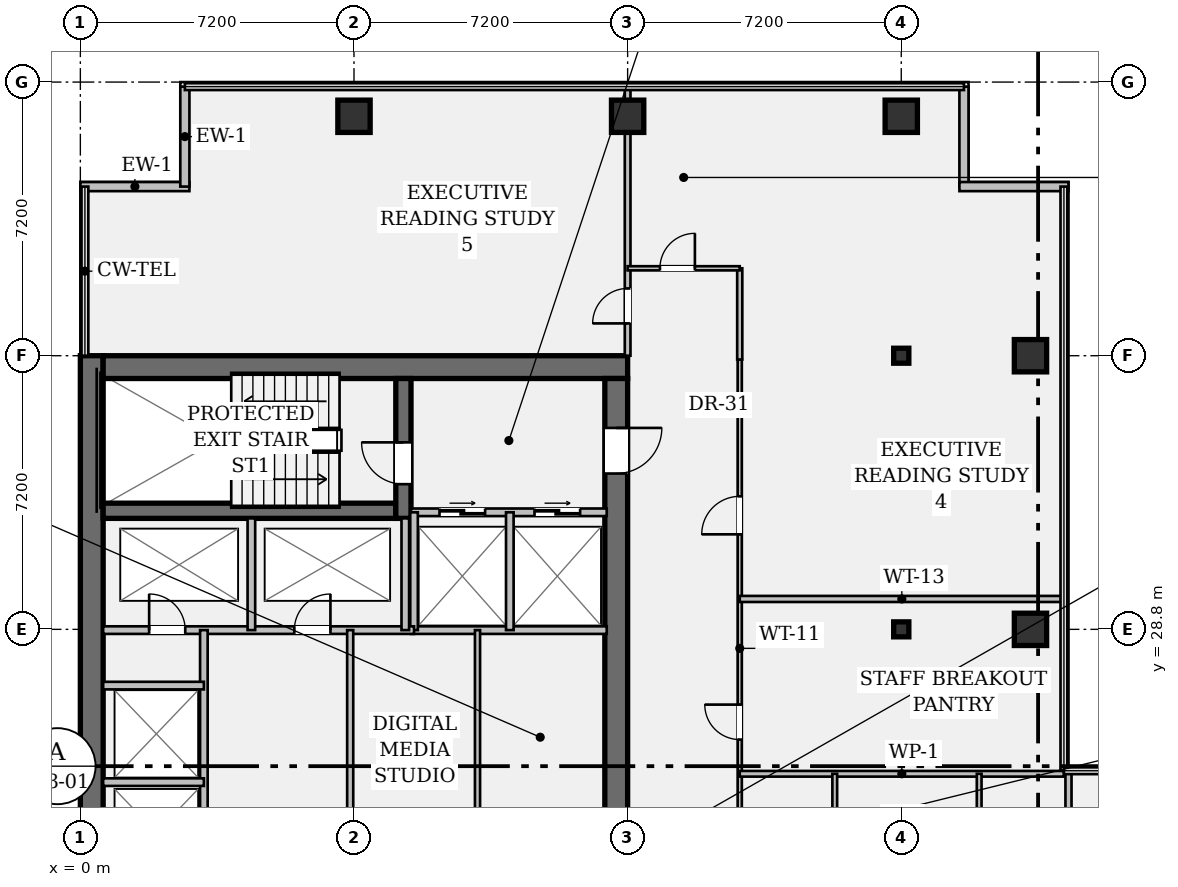
"""IFC4 building model, lengths in metres.
Left out: names, types, materials, properties, quantities, classifications, styles, units other than length and angle.
Written with IfcOpenShell. Run it as: python <this file> out.ifc"""

import sys

from ifc_helpers import new_model, si_unit, direction, frame, frame_2d, origin, origin_2d, place, context, subcontext, project, spatial, rectangle, hollow_rectangle, i_section, extrude, element, fill, save


model = new_model("IFC4")
c1 = context("Model", 3, precision=1e-05, world=origin(), true_north=direction((0.0, 1.0)))
c2 = subcontext(c1, "Body", "Model", "MODEL_VIEW")
j1 = project(units=[si_unit("LENGTHUNIT", "METRE"), si_unit("PLANEANGLEUNIT", "RADIAN")], contexts=[c1])
p1 = place(None, origin())
s1 = spatial("IfcSite", under=j1, at=p1, CompositionType="ELEMENT")
p2 = place(p1, origin())
s2 = spatial("IfcBuilding", under=s1, at=p2, CompositionType="ELEMENT")
p3 = place(p2, frame((0.0, 0.0, 156.1)))
s3 = spatial("IfcBuildingStorey", under=s2, at=p3, CompositionType="ELEMENT", Elevation=156.1)
p4 = place(p3, frame((0.3, 7.2, 0.0), z_axis=(0.0, 0.0, 1.0), x_axis=(0.0, 1.0, 0.0)))
e1 = element("IfcWall", 1, at=p4, inside=s3, PredefinedType="SHEAR", context=c2, shape_type="SweptSolid", body=[
    extrude(rectangle(XDim=28.8, YDim=0.6, at=frame_2d((14.4, 0.0))), origin(), (0.0, 0.0, 1.0), 3.58),
])
p5 = place(p3, frame((0.6, 35.7, 0.0), z_axis=(0.0, 0.0, 1.0), x_axis=(1.0, 0.0, 0.0)))
e2 = element("IfcWall", 2, at=p5, inside=s3, PredefinedType="SHEAR", context=c2, shape_type="SweptSolid", body=[
    extrude(rectangle(XDim=13.8, YDim=0.6, at=frame_2d((6.9, 0.0))), origin(), (0.0, 0.0, 1.0), 3.58),
])
p6 = place(p3, frame((14.1, 35.4, 0.0), z_axis=(0.0, 0.0, 1.0), x_axis=(0.0, -1.0, 0.0)))
e3 = element("IfcWall", 3, at=p6, inside=s3, PredefinedType="SHEAR", context=c2, shape_type="SweptSolid", body=[
    extrude(rectangle(XDim=27.6, YDim=0.6, at=frame_2d((13.8, 0.0))), origin(), (0.0, 0.0, 1.0), 3.58),
])
p7 = place(p6, frame((1.3, 0.0, 0.0)))
e4 = element("IfcOpeningElement", 4, at=p7, cuts=e3, PredefinedType="OPENING", context=c2, shape_type="SweptSolid", body=[
    extrude(rectangle(XDim=1.2, YDim=2.15, at=frame_2d((0.6, 1.075))), frame((0.0, 0.312, 0.0), z_axis=(0.0, -1.0, 0.0), x_axis=(1.0, 0.0, 0.0)), (0.0, 0.0, 1.0), 0.624),
])
p8 = place(p6, frame((25.25, 0.0, 0.0)))
e5 = element("IfcOpeningElement", 5, at=p8, cuts=e3, PredefinedType="OPENING", context=c2, shape_type="SweptSolid", body=[
    extrude(rectangle(XDim=1.2, YDim=2.15, at=frame_2d((0.6, 1.075))), frame((0.0, 0.312, 0.0), z_axis=(0.0, -1.0, 0.0), x_axis=(1.0, 0.0, 0.0)), (0.0, 0.0, 1.0), 0.624),
])
p9 = place(p6, frame((14.6, 0.0, 0.0)))
e6 = element("IfcOpeningElement", 6, at=p9, cuts=e3, PredefinedType="OPENING", context=c2, shape_type="SweptSolid", body=[
    extrude(rectangle(XDim=1.6, YDim=2.2, at=frame_2d((0.8, 1.1))), frame((0.0, 0.312, 0.0), z_axis=(0.0, -1.0, 0.0), x_axis=(1.0, 0.0, 0.0)), (0.0, 0.0, 1.0), 0.624),
])
p10 = place(p3, frame((0.6, 31.92, 0.0), z_axis=(0.0, 0.0, 1.0), x_axis=(1.0, 0.0, 0.0)))
e7 = element("IfcWall", 7, at=p10, inside=s3, PredefinedType="SHEAR", context=c2, shape_type="SweptSolid", body=[
    extrude(rectangle(XDim=7.7, YDim=0.4, at=frame_2d((3.85, 0.0))), origin(), (0.0, 0.0, 1.0), 3.58),
])
p11 = place(p3, frame((8.5, 31.72, 0.0), z_axis=(0.0, 0.0, 1.0), x_axis=(0.0, 1.0, 0.0)))
e8 = element("IfcWall", 8, at=p11, inside=s3, PredefinedType="SHEAR", context=c2, shape_type="SweptSolid", body=[
    extrude(rectangle(XDim=3.68, YDim=0.4, at=frame_2d((1.84, 0.0))), origin(), (0.0, 0.0, 1.0), 3.58),
])
p12 = place(p11, frame((0.9, 0.0, 0.0)))
e9 = element("IfcOpeningElement", 9, at=p12, cuts=e8, PredefinedType="OPENING", context=c2, shape_type="SweptSolid", body=[
    extrude(rectangle(XDim=1.1, YDim=2.15, at=frame_2d((0.55, 1.075))), frame((0.0, 0.212, 0.0), z_axis=(0.0, -1.0, 0.0), x_axis=(1.0, 0.0, 0.0)), (0.0, 0.0, 1.0), 0.424),
])
for number, where, z_axis, x_axis in (
    (10, (7.2, 42.3, 0.0), (0.0, 0.0, 1.0), (1.0, 0.0, 0.0)),
    (11, (14.4, 42.3, 0.0), (0.0, 0.0, 1.0), (1.0, 0.0, 0.0)),
):
    element("IfcColumn", number, at=place(p3, frame(where, z_axis=z_axis, x_axis=x_axis)), inside=s3, PredefinedType="COLUMN", context=c2, shape_type="SweptSolid", body=[
        extrude(hollow_rectangle(XDim=0.85, YDim=0.85, WallThickness=0.05, at=origin_2d()), origin(), (0.0, 0.0, 1.0), 3.58),
    ])
for number, where, z_axis, x_axis in (
    (12, (21.6, 28.8, 0.0), (0.0, 0.0, 1.0), (1.0, 0.0, 0.0)),
    (13, (21.6, 36.0, 0.0), (0.0, 0.0, 1.0), (1.0, 0.0, 0.0)),
):
    element("IfcColumn", number, at=place(p3, frame(where, z_axis=z_axis, x_axis=x_axis)), inside=s3, PredefinedType="COLUMN", context=c2, shape_type="SweptSolid", body=[
        extrude(i_section(OverallWidth=0.399, OverallDepth=0.394, WebThickness=0.023, FlangeThickness=0.037, FilletRadius=0.018, at=origin_2d()), origin(), (0.0, 0.0, 1.0), 3.58),
    ])
for number, where, z_axis, x_axis in (
    (14, (21.6, 42.3, 0.0), (0.0, 0.0, 1.0), (1.0, 0.0, 0.0)),
    (15, (25.0, 28.8, 0.0), (0.0, 0.0, 1.0), (1.0, 0.0, 0.0)),
    (16, (25.0, 36.0, 0.0), (0.0, 0.0, 1.0), (1.0, 0.0, 0.0)),
):
    element("IfcColumn", number, at=place(p3, frame(where, z_axis=z_axis, x_axis=x_axis)), inside=s3, PredefinedType="COLUMN", context=c2, shape_type="SweptSolid", body=[
        extrude(hollow_rectangle(XDim=0.85, YDim=0.85, WallThickness=0.05, at=origin_2d()), origin(), (0.0, 0.0, 1.0), 3.58),
    ])
p13 = place(p3, frame((0.0, 40.45, 0.0), z_axis=(0.0, 0.0, 1.0), x_axis=(1.0, 0.0, 0.0)))
e17 = element("IfcWall", 17, at=p13, inside=s3, PredefinedType="STANDARD", context=c2, shape_type="SweptSolid", body=[
    extrude(rectangle(XDim=2.87, YDim=0.24, at=frame_2d((1.435, 0.0))), origin(), (0.0, 0.0, 1.0), 3.58),
])
for number, where, z_axis, x_axis in (
    (18, (2.75, 40.45, 0.0), (0.0, 0.0, 1.0), (0.0, 1.0, 0.0)),
    (19, (23.25, 43.08, 0.0), (0.0, 0.0, 1.0), (0.0, -1.0, 0.0)),
):
    element("IfcWall", number, at=place(p3, frame(where, z_axis=z_axis, x_axis=x_axis)), inside=s3, PredefinedType="STANDARD", context=c2, shape_type="SweptSolid", body=[
        extrude(rectangle(XDim=2.63, YDim=0.24, at=frame_2d((1.315, 0.0))), origin(), (0.0, 0.0, 1.0), 3.58),
    ])
p14 = place(p3, frame((23.13, 40.45, 0.0), z_axis=(0.0, 0.0, 1.0), x_axis=(1.0, 0.0, 0.0)))
e20 = element("IfcWall", 20, at=p14, inside=s3, PredefinedType="STANDARD", context=c2, shape_type="SweptSolid", body=[
    extrude(rectangle(XDim=2.87, YDim=0.24, at=frame_2d((1.435, 0.0))), origin(), (0.0, 0.0, 1.0), 3.58),
])
p15 = place(p3, frame((8.7, 31.88, 0.0), z_axis=(0.0, 0.0, 1.0), x_axis=(1.0, 0.0, 0.0)))
e21 = element("IfcWall", 21, at=p15, inside=s3, PredefinedType="PARTITIONING", context=c2, shape_type="SweptSolid", body=[
    extrude(rectangle(XDim=5.15, YDim=0.2, at=frame_2d((2.575, 0.0))), origin(), (0.0, 0.0, 1.0), 3.58),
])
p16 = place(p15, frame((0.75, 0.0, 0.0)))
e22 = element("IfcOpeningElement", 22, at=p16, cuts=e21, PredefinedType="OPENING", context=c2, shape_type="SweptSolid", body=[
    extrude(rectangle(XDim=1.2, YDim=2.2, at=frame_2d((0.6, 1.1))), frame((0.0, 0.112, 0.0), z_axis=(0.0, -1.0, 0.0), x_axis=(1.0, 0.0, 0.0)), (0.0, 0.0, 1.0), 0.224),
])
p17 = place(p15, frame((3.25, 0.0, 0.0)))
e23 = element("IfcOpeningElement", 23, at=p17, cuts=e21, PredefinedType="OPENING", context=c2, shape_type="SweptSolid", body=[
    extrude(rectangle(XDim=1.2, YDim=2.2, at=frame_2d((0.6, 1.1))), frame((0.0, 0.112, 0.0), z_axis=(0.0, -1.0, 0.0), x_axis=(1.0, 0.0, 0.0)), (0.0, 0.0, 1.0), 0.224),
])
p18 = place(p3, frame((8.7, 28.78, 0.0), z_axis=(0.0, 0.0, 1.0), x_axis=(1.0, 0.0, 0.0)))
e24 = element("IfcWall", 24, at=p18, inside=s3, PredefinedType="PARTITIONING", context=c2, shape_type="SweptSolid", body=[
    extrude(rectangle(XDim=5.15, YDim=0.2, at=frame_2d((2.575, 0.0))), origin(), (0.0, 0.0, 1.0), 3.58),
])
for number, where, z_axis, x_axis in (
    (25, (8.78, 28.78, 0.0), (0.0, 0.0, 1.0), (0.0, 1.0, 0.0)),
    (26, (11.3, 28.78, 0.0), (0.0, 0.0, 1.0), (0.0, 1.0, 0.0)),
):
    element("IfcWall", number, at=place(p3, frame(where, z_axis=z_axis, x_axis=x_axis)), inside=s3, PredefinedType="PARTITIONING", context=c2, shape_type="SweptSolid", body=[
        extrude(rectangle(XDim=3.1, YDim=0.2, at=frame_2d((1.55, 0.0))), origin(), (0.0, 0.0, 1.0), 3.58),
    ])
p19 = place(p3, frame((0.6, 28.78, 0.0), z_axis=(0.0, 0.0, 1.0), x_axis=(1.0, 0.0, 0.0)))
e27 = element("IfcWall", 27, at=p19, inside=s3, PredefinedType="PARTITIONING", context=c2, shape_type="SweptSolid", body=[
    extrude(rectangle(XDim=8.18, YDim=0.2, at=frame_2d((4.09, 0.0))), origin(), (0.0, 0.0, 1.0), 3.58),
])
p20 = place(p19, frame((1.21, 0.0, 0.0)))
e28 = element("IfcOpeningElement", 28, at=p20, cuts=e27, PredefinedType="OPENING", context=c2, shape_type="SweptSolid", body=[
    extrude(rectangle(XDim=0.95, YDim=2.15, at=frame_2d((0.475, 1.075))), frame((0.0, 0.112, 0.0), z_axis=(0.0, -1.0, 0.0), x_axis=(1.0, 0.0, 0.0)), (0.0, 0.0, 1.0), 0.224),
])
p21 = place(p19, frame((5.03, 0.0, 0.0)))
e29 = element("IfcOpeningElement", 29, at=p21, cuts=e27, PredefinedType="OPENING", context=c2, shape_type="SweptSolid", body=[
    extrude(rectangle(XDim=0.95, YDim=2.15, at=frame_2d((0.475, 1.075))), frame((0.0, 0.112, 0.0), z_axis=(0.0, -1.0, 0.0), x_axis=(1.0, 0.0, 0.0)), (0.0, 0.0, 1.0), 0.224),
])
for number, where, z_axis, x_axis in (
    (30, (4.5, 28.78, 0.0), (0.0, 0.0, 1.0), (0.0, 1.0, 0.0)),
    (31, (8.55, 28.78, 0.0), (0.0, 0.0, 1.0), (0.0, 1.0, 0.0)),
):
    element("IfcWall", number, at=place(p3, frame(where, z_axis=z_axis, x_axis=x_axis)), inside=s3, PredefinedType="PARTITIONING", context=c2, shape_type="SweptSolid", body=[
        extrude(rectangle(XDim=2.94, YDim=0.2, at=frame_2d((1.47, 0.0))), origin(), (0.0, 0.0, 1.0), 3.58),
    ])
p22 = place(p3, frame((3.25, 15.7, 0.0), z_axis=(0.0, 0.0, 1.0), x_axis=(0.0, 1.0, 0.0)))
e32 = element("IfcWall", 32, at=p22, inside=s3, PredefinedType="PARTITIONING", context=c2, shape_type="SweptSolid", body=[
    extrude(rectangle(XDim=13.08, YDim=0.2, at=frame_2d((6.54, 0.0))), origin(), (0.0, 0.0, 1.0), 3.58),
])
for number, where, z_axis, x_axis in (
    (33, (0.6, 24.78, 0.0), (0.0, 0.0, 1.0), (1.0, 0.0, 0.0)),
    (34, (0.6, 27.32, 0.0), (0.0, 0.0, 1.0), (1.0, 0.0, 0.0)),
):
    element("IfcWall", number, at=place(p3, frame(where, z_axis=z_axis, x_axis=x_axis)), inside=s3, PredefinedType="PARTITIONING", context=c2, shape_type="SweptSolid", body=[
        extrude(rectangle(XDim=2.65, YDim=0.2, at=frame_2d((1.325, 0.0))), origin(), (0.0, 0.0, 1.0), 3.58),
    ])
p23 = place(p3, frame((7.1, 22.2, 0.0), z_axis=(0.0, 0.0, 1.0), x_axis=(0.0, 1.0, 0.0)))
e35 = element("IfcWall", 35, at=p23, inside=s3, PredefinedType="PARTITIONING", context=c2, shape_type="SweptSolid", body=[
    extrude(rectangle(XDim=6.58, YDim=0.16, at=frame_2d((3.29, 0.0))), origin(), (0.0, 0.0, 1.0), 3.58),
])
p24 = place(p3, frame((10.45, 22.2, 0.0), z_axis=(0.0, 0.0, 1.0), x_axis=(0.0, 1.0, 0.0)))
e36 = element("IfcWall", 36, at=p24, inside=s3, PredefinedType="PARTITIONING", context=c2, shape_type="SweptSolid", body=[
    extrude(rectangle(XDim=6.58, YDim=0.135, at=frame_2d((3.29, 0.0))), origin(), (0.0, 0.0, 1.0), 3.58),
])
p25 = place(p3, frame((17.35, 20.7, 0.0), z_axis=(0.0, 0.0, 1.0), x_axis=(0.0, 1.0, 0.0)))
e37 = element("IfcWall", 37, at=p25, inside=s3, PredefinedType="PARTITIONING", context=c2, shape_type="SweptSolid", body=[
    extrude(rectangle(XDim=15.2, YDim=0.11, at=frame_2d((7.6, 0.0))), origin(), (0.0, 0.0, 1.0), 2.869),
])
p26 = place(p25, frame((5.2, 0.0, 0.0)))
e38 = element("IfcOpeningElement", 38, at=p26, cuts=e37, PredefinedType="OPENING", context=c2, shape_type="SweptSolid", body=[
    extrude(rectangle(XDim=0.92, YDim=2.15, at=frame_2d((0.46, 1.075))), frame((0.0, 0.067, 0.0), z_axis=(0.0, -1.0, 0.0), x_axis=(1.0, 0.0, 0.0)), (0.0, 0.0, 1.0), 0.134),
])
p27 = place(p25, frame((10.6, 0.0, 0.0)))
e39 = element("IfcOpeningElement", 39, at=p27, cuts=e37, PredefinedType="OPENING", context=c2, shape_type="SweptSolid", body=[
    extrude(rectangle(XDim=1.0, YDim=2.15, at=frame_2d((0.5, 1.075))), frame((0.0, 0.067, 0.0), z_axis=(0.0, -1.0, 0.0), x_axis=(1.0, 0.0, 0.0)), (0.0, 0.0, 1.0), 0.134),
])
p28 = place(p3, frame((17.35, 25.0, 0.0), z_axis=(0.0, 0.0, 1.0), x_axis=(1.0, 0.0, 0.0)))
e40 = element("IfcWall", 40, at=p28, inside=s3, PredefinedType="PARTITIONING", context=c2, shape_type="SweptSolid", body=[
    extrude(rectangle(XDim=8.53, YDim=0.15, at=frame_2d((4.265, 0.0))), origin(), (0.0, 0.0, 1.0), 2.869),
])
for number, where, z_axis, x_axis in (
    (41, (19.85, 20.7, 0.0), (0.0, 0.0, 1.0), (0.0, 1.0, 0.0)),
    (42, (23.65, 20.7, 0.0), (0.0, 0.0, 1.0), (0.0, 1.0, 0.0)),
):
    element("IfcWall", number, at=place(p3, frame(where, z_axis=z_axis, x_axis=x_axis)), inside=s3, PredefinedType="PARTITIONING", context=c2, shape_type="SweptSolid", body=[
        extrude(rectangle(XDim=4.3, YDim=0.125, at=frame_2d((2.15, 0.0))), origin(), (0.0, 0.0, 1.0), 2.869),
    ])
p29 = place(p3, frame((17.35, 29.6, 0.0), z_axis=(0.0, 0.0, 1.0), x_axis=(1.0, 0.0, 0.0)))
e43 = element("IfcWall", 43, at=p29, inside=s3, PredefinedType="PARTITIONING", context=c2, shape_type="SweptSolid", body=[
    extrude(rectangle(XDim=8.53, YDim=0.16, at=frame_2d((4.265, 0.0))), origin(), (0.0, 0.0, 1.0), 2.869),
])
p30 = place(p3, frame((14.4, 36.0, 0.0), z_axis=(0.0, 0.0, 1.0), x_axis=(0.0, 1.0, 0.0)))
e44 = element("IfcWall", 44, at=p30, inside=s3, PredefinedType="PARTITIONING", context=c2, shape_type="SweptSolid", body=[
    extrude(rectangle(XDim=7.08, YDim=0.15, at=frame_2d((3.54, 0.0))), origin(), (0.0, 0.0, 1.0), 2.869),
])
p31 = place(p30, frame((0.85, 0.0, 0.0)))
e45 = element("IfcOpeningElement", 45, at=p31, cuts=e44, PredefinedType="OPENING", context=c2, shape_type="SweptSolid", body=[
    extrude(rectangle(XDim=0.92, YDim=2.15, at=frame_2d((0.46, 1.075))), frame((0.0, 0.087, 0.0), z_axis=(0.0, -1.0, 0.0), x_axis=(1.0, 0.0, 0.0)), (0.0, 0.0, 1.0), 0.174),
])
p32 = place(p3, frame((17.35, 35.9, 0.0), z_axis=(0.0, 0.0, 1.0), x_axis=(0.0, 1.0, 0.0)))
e46 = element("IfcWall", 46, at=p32, inside=s3, PredefinedType="PARTITIONING", context=c2, shape_type="SweptSolid", body=[
    extrude(rectangle(XDim=2.4, YDim=0.135, at=frame_2d((1.2, 0.0))), origin(), (0.0, 0.0, 1.0), 2.869),
])
p33 = place(p3, frame((14.4, 38.3, 0.0), z_axis=(0.0, 0.0, 1.0), x_axis=(1.0, 0.0, 0.0)))
e47 = element("IfcWall", 47, at=p33, inside=s3, PredefinedType="PARTITIONING", context=c2, shape_type="SweptSolid", body=[
    extrude(rectangle(XDim=2.95, YDim=0.11, at=frame_2d((1.475, 0.0))), origin(), (0.0, 0.0, 1.0), 3.148),
])
p34 = place(p33, frame((0.85, 0.0, 0.0)))
e48 = element("IfcOpeningElement", 48, at=p34, cuts=e47, PredefinedType="OPENING", context=c2, shape_type="SweptSolid", body=[
    extrude(rectangle(XDim=0.92, YDim=2.15, at=frame_2d((0.46, 1.075))), frame((0.0, 0.067, 0.0), z_axis=(0.0, -1.0, 0.0), x_axis=(1.0, 0.0, 0.0)), (0.0, 0.0, 1.0), 0.134),
])
p35 = place(p3, frame((26.0, 20.7, 0.0), z_axis=(0.0, 0.0, 1.0), x_axis=(0.0, 1.0, 0.0)))
e49 = element("IfcWall", 49, at=p35, inside=s3, PredefinedType="PARTITIONING", context=c2, shape_type="SweptSolid", body=[
    extrude(rectangle(XDim=4.38, YDim=0.16, at=frame_2d((2.19, 0.0))), origin(), (0.0, 0.0, 1.0), 2.869),
])
p36 = place(p12, origin())
e50 = element("IfcDoor", 50, at=p36, inside=s3, OperationType="SINGLE_SWING_RIGHT", PredefinedType="DOOR", context=c2, shape_type="SweptSolid", body=[
    extrude(rectangle(XDim=1.1, YDim=2.15, at=frame_2d((0.55, 1.075))), frame((0.0, 0.025, 0.0), z_axis=(0.0, -1.0, 0.0), x_axis=(1.0, 0.0, 0.0)), (0.0, 0.0, 1.0), 0.05),
])
fill(e9, e50)
p37 = place(p7, origin())
e51 = element("IfcDoor", 51, at=p37, inside=s3, OperationType="SINGLE_SWING_LEFT", PredefinedType="DOOR", context=c2, shape_type="SweptSolid", body=[
    extrude(rectangle(XDim=1.2, YDim=2.15, at=frame_2d((0.6, 1.075))), frame((0.0, 0.025, 0.0), z_axis=(0.0, -1.0, 0.0), x_axis=(1.0, 0.0, 0.0)), (0.0, 0.0, 1.0), 0.05),
])
fill(e4, e51)
p38 = place(p16, origin())
e52 = element("IfcDoor", 52, at=p38, inside=s3, OperationType="DOUBLE_DOOR_SLIDING", PredefinedType="DOOR", context=c2, shape_type="SweptSolid", body=[
    extrude(rectangle(XDim=1.2, YDim=2.2, at=frame_2d((0.6, 1.1))), frame((0.0, 0.025, 0.0), z_axis=(0.0, -1.0, 0.0), x_axis=(1.0, 0.0, 0.0)), (0.0, 0.0, 1.0), 0.05),
])
fill(e22, e52)
p39 = place(p17, origin())
e53 = element("IfcDoor", 53, at=p39, inside=s3, OperationType="DOUBLE_DOOR_SLIDING", PredefinedType="DOOR", context=c2, shape_type="SweptSolid", body=[
    extrude(rectangle(XDim=1.2, YDim=2.2, at=frame_2d((0.6, 1.1))), frame((0.0, 0.025, 0.0), z_axis=(0.0, -1.0, 0.0), x_axis=(1.0, 0.0, 0.0)), (0.0, 0.0, 1.0), 0.05),
])
fill(e23, e53)
p40 = place(p20, origin())
e54 = element("IfcDoor", 54, at=p40, inside=s3, OperationType="SINGLE_SWING_LEFT", PredefinedType="DOOR", context=c2, shape_type="SweptSolid", body=[
    extrude(rectangle(XDim=0.95, YDim=2.15, at=frame_2d((0.475, 1.075))), frame((0.0, 0.025, 0.0), z_axis=(0.0, -1.0, 0.0), x_axis=(1.0, 0.0, 0.0)), (0.0, 0.0, 1.0), 0.05),
])
fill(e28, e54)
p41 = place(p21, origin())
e55 = element("IfcDoor", 55, at=p41, inside=s3, OperationType="SINGLE_SWING_RIGHT", PredefinedType="DOOR", context=c2, shape_type="SweptSolid", body=[
    extrude(rectangle(XDim=0.95, YDim=2.15, at=frame_2d((0.475, 1.075))), frame((0.0, 0.025, 0.0), z_axis=(0.0, -1.0, 0.0), x_axis=(1.0, 0.0, 0.0)), (0.0, 0.0, 1.0), 0.05),
])
fill(e29, e55)
p42 = place(p26, origin())
e56 = element("IfcDoor", 56, at=p42, inside=s3, OperationType="SINGLE_SWING_RIGHT", PredefinedType="DOOR", context=c2, shape_type="SweptSolid", body=[
    extrude(rectangle(XDim=0.92, YDim=2.15, at=frame_2d((0.46, 1.075))), frame((0.0, 0.025, 0.0), z_axis=(0.0, -1.0, 0.0), x_axis=(1.0, 0.0, 0.0)), (0.0, 0.0, 1.0), 0.05),
])
fill(e38, e56)
p43 = place(p27, origin())
e57 = element("IfcDoor", 57, at=p43, inside=s3, OperationType="SINGLE_SWING_LEFT", PredefinedType="DOOR", context=c2, shape_type="SweptSolid", body=[
    extrude(rectangle(XDim=1.0, YDim=2.15, at=frame_2d((0.5, 1.075))), frame((0.0, 0.025, 0.0), z_axis=(0.0, -1.0, 0.0), x_axis=(1.0, 0.0, 0.0)), (0.0, 0.0, 1.0), 0.05),
])
fill(e39, e57)
p44 = place(p31, origin())
e58 = element("IfcDoor", 58, at=p44, inside=s3, OperationType="SINGLE_SWING_LEFT", PredefinedType="DOOR", context=c2, shape_type="SweptSolid", body=[
    extrude(rectangle(XDim=0.92, YDim=2.15, at=frame_2d((0.46, 1.075))), frame((0.0, 0.025, 0.0), z_axis=(0.0, -1.0, 0.0), x_axis=(1.0, 0.0, 0.0)), (0.0, 0.0, 1.0), 0.05),
])
fill(e45, e58)
p45 = place(p34, origin())
e59 = element("IfcDoor", 59, at=p45, inside=s3, OperationType="SINGLE_SWING_RIGHT", PredefinedType="DOOR", context=c2, shape_type="SweptSolid", body=[
    extrude(rectangle(XDim=0.92, YDim=2.15, at=frame_2d((0.46, 1.075))), frame((0.0, 0.025, 0.0), z_axis=(0.0, -1.0, 0.0), x_axis=(1.0, 0.0, 0.0)), (0.0, 0.0, 1.0), 0.05),
])
fill(e48, e59)
save(model, sys.argv[1])
